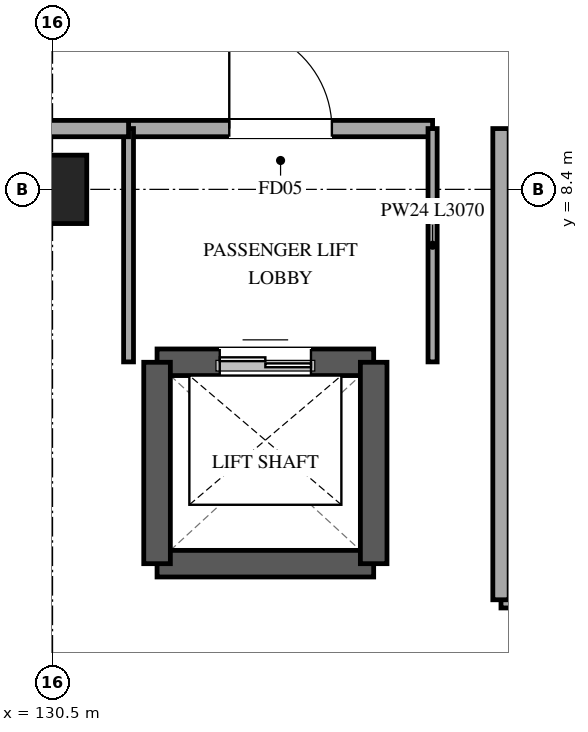
"""IFC4 building model, lengths in metres.
Left out: names, types, materials, properties, quantities, classifications, styles, units other than length and angle.
Written with IfcOpenShell. Run it as: python <this file> out.ifc"""

import sys

from ifc_helpers import new_model, si_unit, direction, frame, frame_2d, origin, origin_2d, place, context, subcontext, project, spatial, rectangle, extrude, element, fill, save


model = new_model("IFC4")
c1 = context("Model", 3, precision=1e-05, world=origin(), true_north=direction((0.0, 1.0)))
c2 = subcontext(c1, "Body", "Model", "MODEL_VIEW")
j1 = project(units=[si_unit("LENGTHUNIT", "METRE"), si_unit("PLANEANGLEUNIT", "RADIAN")], contexts=[c1])
p1 = place(None, origin())
s1 = spatial("IfcSite", under=j1, at=p1, CompositionType="ELEMENT")
p2 = place(p1, origin())
s2 = spatial("IfcBuilding", under=s1, at=p2, CompositionType="ELEMENT")
p3 = place(p2, frame((0.0, 0.0, 11.4)))
s3 = spatial("IfcBuildingStorey", under=s2, at=p3, CompositionType="ELEMENT", Elevation=11.4)
p4 = place(p3, frame((130.5, 8.4, 0.0), z_axis=(0.0, 0.0, 1.0), x_axis=(1.0, 0.0, 0.0)))
e1 = element("IfcColumn", 1, at=p4, inside=s3, PredefinedType="COLUMN", context=c2, shape_type="SweptSolid", body=[
    extrude(rectangle(XDim=0.9, YDim=0.9, at=origin_2d()), origin(), (0.0, 0.0, 1.0), 5.1),
])
p5 = place(p3, frame((131.875, 6.125, 0.0), z_axis=(0.0, 0.0, 1.0), x_axis=(1.0, 0.0, 0.0)))
e2 = element("IfcWall", 2, at=p5, inside=s3, PredefinedType="SHEAR", context=c2, shape_type="SweptSolid", body=[
    extrude(rectangle(XDim=2.85, YDim=0.35, at=frame_2d((1.425, 0.0))), origin(), (0.0, 0.0, 1.0), 5.1),
])
p6 = place(p5, frame((0.825, 0.0, 0.0)))
e3 = element("IfcOpeningElement", 3, at=p6, cuts=e2, PredefinedType="OPENING", context=c2, shape_type="SweptSolid", body=[
    extrude(rectangle(XDim=1.2, YDim=2.2, at=frame_2d((0.6, 1.1))), frame((0.0, 0.185, 0.0), z_axis=(0.0, -1.0, 0.0), x_axis=(1.0, 0.0, 0.0)), (0.0, 0.0, 1.0), 0.37),
])
p7 = place(p3, frame((134.725, 3.475, 0.0), z_axis=(0.0, 0.0, 1.0), x_axis=(-1.0, 0.0, 0.0)))
e4 = element("IfcWall", 4, at=p7, inside=s3, PredefinedType="SHEAR", context=c2, shape_type="SweptSolid", body=[
    extrude(rectangle(XDim=2.85, YDim=0.35, at=frame_2d((1.425, 0.0))), origin(), (0.0, 0.0, 1.0), 5.1),
])
for number, where, z_axis, x_axis in (
    (5, (131.875, 3.475, 0.0), (0.0, 0.0, 1.0), (0.0, 1.0, 0.0)),
    (6, (134.725, 6.125, 0.0), (0.0, 0.0, 1.0), (0.0, -1.0, 0.0)),
):
    element("IfcWall", number, at=place(p3, frame(where, z_axis=z_axis, x_axis=x_axis)), inside=s3, PredefinedType="SHEAR", context=c2, shape_type="SweptSolid", body=[
        extrude(rectangle(XDim=2.65, YDim=0.35, at=frame_2d((1.325, 0.0))), origin(), (0.0, 0.0, 1.0), 5.1),
    ])
p8 = place(p3, frame((131.5, 9.2, 0.0), z_axis=(0.0, 0.0, 1.0), x_axis=(1.0, 0.0, 0.0)))
e7 = element("IfcWall", 7, at=p8, inside=s3, PredefinedType="PARTITIONING", context=c2, shape_type="SweptSolid", body=[
    extrude(rectangle(XDim=4.0, YDim=0.215, at=frame_2d((2.0, 0.0))), origin(), (0.0, 0.0, 1.0), 4.76),
])
p9 = place(p8, frame((1.325, 0.0, 0.0)))
e8 = element("IfcOpeningElement", 8, at=p9, cuts=e7, PredefinedType="OPENING", context=c2, shape_type="SweptSolid", body=[
    extrude(rectangle(XDim=1.35, YDim=2.2, at=frame_2d((0.675, 1.1))), frame((0.0, 0.118, 0.0), z_axis=(0.0, -1.0, 0.0), x_axis=(1.0, 0.0, 0.0)), (0.0, 0.0, 1.0), 0.235),
])
p10 = place(p3, frame((131.5, 6.13, 0.0), z_axis=(0.0, 0.0, 1.0), x_axis=(0.0, 1.0, 0.0)))
e9 = element("IfcWall", 9, at=p10, inside=s3, PredefinedType="PARTITIONING", context=c2, shape_type="SweptSolid", body=[
    extrude(rectangle(XDim=3.07, YDim=0.13, at=frame_2d((1.535, 0.0))), origin(), (0.0, 0.0, 1.0), 4.045),
])
p11 = place(p3, frame((135.5, 9.2, 0.0), z_axis=(0.0, 0.0, 1.0), x_axis=(0.0, -1.0, 0.0)))
e10 = element("IfcWall", 10, at=p11, inside=s3, PredefinedType="PARTITIONING", context=c2, shape_type="SweptSolid", body=[
    extrude(rectangle(XDim=3.07, YDim=0.12, at=frame_2d((1.535, 0.0))), origin(), (0.0, 0.0, 1.0), 4.045),
])
p12 = place(p3, frame((131.5, 9.2, 0.0), z_axis=(0.0, 0.0, 1.0), x_axis=(-1.0, 0.0, 0.0)))
e11 = element("IfcWall", 11, at=p12, inside=s3, PredefinedType="PARTITIONING", context=c2, shape_type="SweptSolid", body=[
    extrude(rectangle(XDim=9.7, YDim=0.215, at=frame_2d((4.85, 0.0))), origin(), (0.0, 0.0, 1.0), 4.045),
])
p13 = place(p3, frame((140.75, 3.0, 0.0), z_axis=(0.0, 0.0, 1.0), x_axis=(-1.0, 0.0, 0.0)))
e12 = element("IfcWall", 12, at=p13, inside=s3, PredefinedType="PARTITIONING", context=c2, shape_type="SweptSolid", body=[
    extrude(rectangle(XDim=4.35, YDim=0.215, at=frame_2d((2.175, 0.0))), origin(), (0.0, 0.0, 1.0), 4.045),
])
p14 = place(p3, frame((136.4, 3.0, 0.0), z_axis=(0.0, 0.0, 1.0), x_axis=(0.0, 1.0, 0.0)))
e13 = element("IfcWall", 13, at=p14, inside=s3, PredefinedType="PARTITIONING", context=c2, shape_type="SweptSolid", body=[
    extrude(rectangle(XDim=6.2, YDim=0.215, at=frame_2d((3.1, 0.0))), origin(), (0.0, 0.0, 1.0), 4.045),
])
p15 = place(p6, origin())
e14 = element("IfcDoor", 14, at=p15, inside=s3, OperationType="DOUBLE_DOOR_SLIDING", PredefinedType="DOOR", context=c2, shape_type="SweptSolid", body=[
    extrude(rectangle(XDim=1.2, YDim=2.2, at=frame_2d((0.6, 1.1))), frame((0.0, 0.025, 0.0), z_axis=(0.0, -1.0, 0.0), x_axis=(1.0, 0.0, 0.0)), (0.0, 0.0, 1.0), 0.05),
])
fill(e3, e14)
p16 = place(p9, origin())
e15 = element("IfcDoor", 15, at=p16, inside=s3, OperationType="SINGLE_SWING_LEFT", PredefinedType="DOOR", context=c2, shape_type="SweptSolid", body=[
    extrude(rectangle(XDim=1.35, YDim=2.2, at=frame_2d((0.675, 1.1))), frame((0.0, 0.025, 0.0), z_axis=(0.0, -1.0, 0.0), x_axis=(1.0, 0.0, 0.0)), (0.0, 0.0, 1.0), 0.05),
])
fill(e8, e15)
save(model, sys.argv[1])
